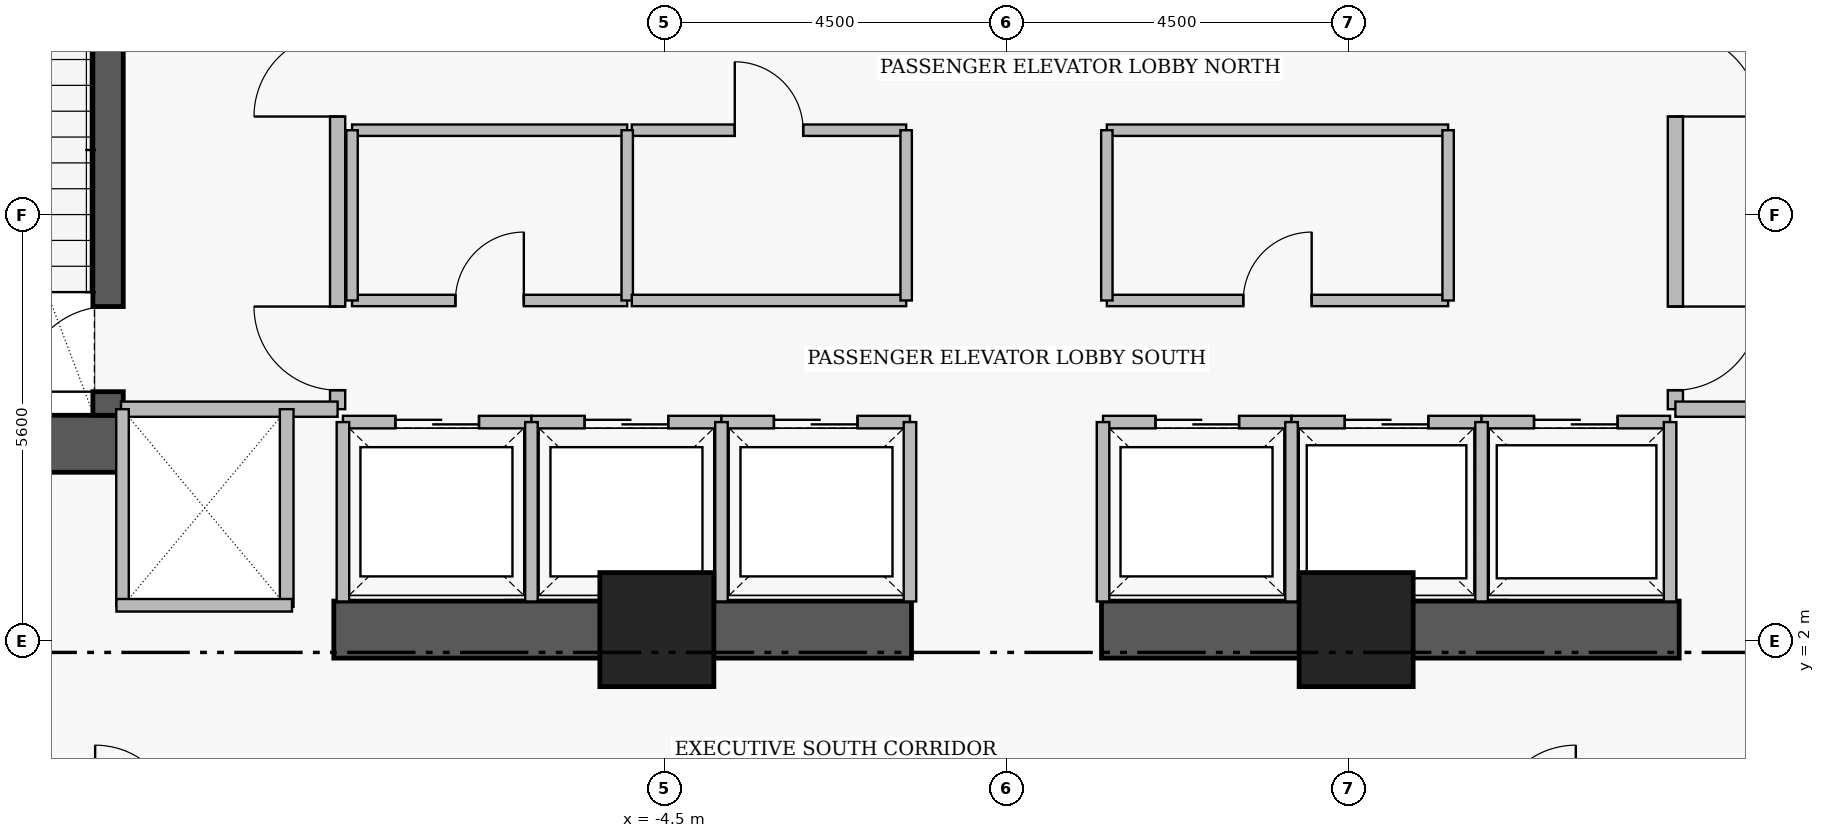
"""IFC4 building model, lengths in metres.
Left out: names, types, materials, properties, quantities, classifications, styles, units other than length and angle.
Written with IfcOpenShell. Run it as: python <this file> out.ifc"""

import sys

from ifc_helpers import new_model, si_unit, direction, frame, frame_2d, origin, origin_2d, place, context, subcontext, project, spatial, rectangle, extrude, element, fill, save


model = new_model("IFC4")
c1 = context("Model", 3, precision=1e-05, world=origin(), true_north=direction((0.0, 1.0)))
c2 = subcontext(c1, "Body", "Model", "MODEL_VIEW")
j1 = project(units=[si_unit("LENGTHUNIT", "METRE"), si_unit("PLANEANGLEUNIT", "RADIAN")], contexts=[c1])
p1 = place(None, origin())
s1 = spatial("IfcSite", under=j1, at=p1, CompositionType="ELEMENT")
p2 = place(p1, origin())
s2 = spatial("IfcBuilding", under=s1, at=p2, CompositionType="ELEMENT")
p3 = place(p2, frame((0.0, 0.0, 154.05)))
s3 = spatial("IfcBuildingStorey", under=s2, at=p3, CompositionType="ELEMENT", Elevation=154.05)
p4 = place(p3, frame((-16.16, 4.595, 0.0), z_axis=(0.0, 0.0, 1.0), x_axis=(1.0, 0.0, 0.0)))
e1 = element("IfcWall", 1, at=p4, inside=s3, PredefinedType="SHEAR", context=c2, shape_type="SweptSolid", body=[
    extrude(rectangle(XDim=4.56, YDim=0.75, at=frame_2d((2.28, 0.0))), origin(), (0.0, 0.0, 1.0), 4.31),
])
for number, where, z_axis, x_axis in (
    (2, (-8.85, 2.15, 0.0), (0.0, 0.0, 1.0), (1.0, 0.0, 0.0)),
    (3, (1.25, 2.15, 0.0), (0.0, 0.0, 1.0), (1.0, 0.0, 0.0)),
):
    element("IfcWall", number, at=place(p3, frame(where, z_axis=z_axis, x_axis=x_axis)), inside=s3, PredefinedType="SHEAR", context=c2, shape_type="SweptSolid", body=[
        extrude(rectangle(XDim=7.6, YDim=0.75, at=frame_2d((3.8, 0.0))), origin(), (0.0, 0.0, 1.0), 4.28),
    ])
p5 = place(p3, frame((-11.82, 4.97, 0.0), z_axis=(0.0, 0.0, 1.0), x_axis=(0.0, 1.0, 0.0)))
e4 = element("IfcWall", 4, at=p5, inside=s3, PredefinedType="SHEAR", context=c2, shape_type="SweptSolid", body=[
    extrude(rectangle(XDim=8.96, YDim=0.4, at=frame_2d((4.48, 0.0))), origin(), (0.0, 0.0, 1.0), 4.31),
])
p6 = place(p5, frame((0.31, 0.0, 0.0)))
e5 = element("IfcOpeningElement", 5, at=p6, cuts=e4, PredefinedType="OPENING", context=c2, shape_type="SweptSolid", body=[
    extrude(rectangle(XDim=1.12, YDim=2.22, at=frame_2d((0.56, 1.11))), frame((0.0, 0.21, 0.0), z_axis=(0.0, -1.0, 0.0), x_axis=(1.0, 0.0, 0.0)), (0.0, 0.0, 1.0), 0.42),
])
for number, where, z_axis, x_axis in (
    (6, (-4.6, 2.15, 0.0), (0.0, 0.0, 1.0), (1.0, 0.0, 0.0)),
    (7, (4.6, 2.15, 0.0), (0.0, 0.0, 1.0), (1.0, 0.0, 0.0)),
):
    element("IfcColumn", number, at=place(p3, frame(where, z_axis=z_axis, x_axis=x_axis)), inside=s3, PredefinedType="COLUMN", context=c2, shape_type="SweptSolid", body=[
        extrude(rectangle(XDim=1.5, YDim=1.5, at=origin_2d()), origin(), (0.0, 0.0, 1.0), 4.5),
    ])
p7 = place(p3, frame((-8.8, 5.05, 0.0), z_axis=(0.0, 0.0, 1.0), x_axis=(0.0, 1.0, 0.0)))
e8 = element("IfcWall", 8, at=p7, inside=s3, PredefinedType="PARTITIONING", context=c2, shape_type="SweptSolid", body=[
    extrude(rectangle(XDim=6.1, YDim=0.2, at=frame_2d((3.05, 0.0))), origin(), (0.0, 0.0, 1.0), 4.28),
])
p8 = place(p7, frame((0.25, 0.0, 0.0)))
e9 = element("IfcOpeningElement", 9, at=p8, cuts=e8, PredefinedType="OPENING", context=c2, shape_type="SweptSolid", body=[
    extrude(rectangle(XDim=1.1, YDim=2.2, at=frame_2d((0.55, 1.1))), frame((0.0, 0.11, 0.0), z_axis=(0.0, -1.0, 0.0), x_axis=(1.0, 0.0, 0.0)), (0.0, 0.0, 1.0), 0.22),
])
p9 = place(p7, frame((3.85, 0.0, 0.0)))
e10 = element("IfcOpeningElement", 10, at=p9, cuts=e8, PredefinedType="OPENING", context=c2, shape_type="SweptSolid", body=[
    extrude(rectangle(XDim=1.1, YDim=2.2, at=frame_2d((0.55, 1.1))), frame((0.0, 0.11, 0.0), z_axis=(0.0, -1.0, 0.0), x_axis=(1.0, 0.0, 0.0)), (0.0, 0.0, 1.0), 0.22),
])
p10 = place(p3, frame((8.8, 11.15, 0.0), z_axis=(0.0, 0.0, 1.0), x_axis=(0.0, -1.0, 0.0)))
e11 = element("IfcWall", 11, at=p10, inside=s3, PredefinedType="PARTITIONING", context=c2, shape_type="SweptSolid", body=[
    extrude(rectangle(XDim=6.1, YDim=0.2, at=frame_2d((3.05, 0.0))), origin(), (0.0, 0.0, 1.0), 4.28),
])
p11 = place(p10, frame((1.15, 0.0, 0.0)))
e12 = element("IfcOpeningElement", 12, at=p11, cuts=e11, PredefinedType="OPENING", context=c2, shape_type="SweptSolid", body=[
    extrude(rectangle(XDim=1.1, YDim=2.2, at=frame_2d((0.55, 1.1))), frame((0.0, 0.11, 0.0), z_axis=(0.0, -1.0, 0.0), x_axis=(1.0, 0.0, 0.0)), (0.0, 0.0, 1.0), 0.22),
])
p12 = place(p10, frame((4.75, 0.0, 0.0)))
e13 = element("IfcOpeningElement", 13, at=p12, cuts=e11, PredefinedType="OPENING", context=c2, shape_type="SweptSolid", body=[
    extrude(rectangle(XDim=1.1, YDim=2.2, at=frame_2d((0.55, 1.1))), frame((0.0, 0.11, 0.0), z_axis=(0.0, -1.0, 0.0), x_axis=(1.0, 0.0, 0.0)), (0.0, 0.0, 1.0), 0.22),
])
p13 = place(p3, frame((-8.73, 4.88, 0.0), z_axis=(0.0, 0.0, 1.0), x_axis=(1.0, 0.0, 0.0)))
e14 = element("IfcWall", 14, at=p13, inside=s3, PredefinedType="PARTITIONING", context=c2, shape_type="SweptSolid", body=[
    extrude(rectangle(XDim=2.48, YDim=0.165, at=frame_2d((1.24, 0.0))), origin(), (0.0, 0.0, 1.0), 4.28),
])
p14 = place(p13, frame((0.69, 0.0, 0.0)))
e15 = element("IfcOpeningElement", 15, at=p14, cuts=e14, PredefinedType="OPENING", context=c2, shape_type="SweptSolid", body=[
    extrude(rectangle(XDim=1.1, YDim=2.25, at=frame_2d((0.55, 1.125))), frame((0.0, 0.093, 0.0), z_axis=(0.0, -1.0, 0.0), x_axis=(1.0, 0.0, 0.0)), (0.0, 0.0, 1.0), 0.185),
])
p15 = place(p3, frame((-6.25, 4.88, 0.0), z_axis=(0.0, 0.0, 1.0), x_axis=(1.0, 0.0, 0.0)))
e16 = element("IfcWall", 16, at=p15, inside=s3, PredefinedType="PARTITIONING", context=c2, shape_type="SweptSolid", body=[
    extrude(rectangle(XDim=2.5, YDim=0.165, at=frame_2d((1.25, 0.0))), origin(), (0.0, 0.0, 1.0), 4.28),
])
p16 = place(p15, frame((0.7, 0.0, 0.0)))
e17 = element("IfcOpeningElement", 17, at=p16, cuts=e16, PredefinedType="OPENING", context=c2, shape_type="SweptSolid", body=[
    extrude(rectangle(XDim=1.1, YDim=2.25, at=frame_2d((0.55, 1.125))), frame((0.0, 0.093, 0.0), z_axis=(0.0, -1.0, 0.0), x_axis=(1.0, 0.0, 0.0)), (0.0, 0.0, 1.0), 0.185),
])
p17 = place(p3, frame((-3.75, 4.88, 0.0), z_axis=(0.0, 0.0, 1.0), x_axis=(1.0, 0.0, 0.0)))
e18 = element("IfcWall", 18, at=p17, inside=s3, PredefinedType="PARTITIONING", context=c2, shape_type="SweptSolid", body=[
    extrude(rectangle(XDim=2.48, YDim=0.165, at=frame_2d((1.24, 0.0))), origin(), (0.0, 0.0, 1.0), 4.28),
])
p18 = place(p17, frame((0.69, 0.0, 0.0)))
e19 = element("IfcOpeningElement", 19, at=p18, cuts=e18, PredefinedType="OPENING", context=c2, shape_type="SweptSolid", body=[
    extrude(rectangle(XDim=1.1, YDim=2.25, at=frame_2d((0.55, 1.125))), frame((0.0, 0.093, 0.0), z_axis=(0.0, -1.0, 0.0), x_axis=(1.0, 0.0, 0.0)), (0.0, 0.0, 1.0), 0.185),
])
p19 = place(p3, frame((1.27, 4.88, 0.0), z_axis=(0.0, 0.0, 1.0), x_axis=(1.0, 0.0, 0.0)))
e20 = element("IfcWall", 20, at=p19, inside=s3, PredefinedType="PARTITIONING", context=c2, shape_type="SweptSolid", body=[
    extrude(rectangle(XDim=2.48, YDim=0.165, at=frame_2d((1.24, 0.0))), origin(), (0.0, 0.0, 1.0), 4.28),
])
p20 = place(p19, frame((0.69, 0.0, 0.0)))
e21 = element("IfcOpeningElement", 21, at=p20, cuts=e20, PredefinedType="OPENING", context=c2, shape_type="SweptSolid", body=[
    extrude(rectangle(XDim=1.1, YDim=2.25, at=frame_2d((0.55, 1.125))), frame((0.0, 0.093, 0.0), z_axis=(0.0, -1.0, 0.0), x_axis=(1.0, 0.0, 0.0)), (0.0, 0.0, 1.0), 0.185),
])
p21 = place(p3, frame((3.75, 4.88, 0.0), z_axis=(0.0, 0.0, 1.0), x_axis=(1.0, 0.0, 0.0)))
e22 = element("IfcWall", 22, at=p21, inside=s3, PredefinedType="PARTITIONING", context=c2, shape_type="SweptSolid", body=[
    extrude(rectangle(XDim=2.5, YDim=0.165, at=frame_2d((1.25, 0.0))), origin(), (0.0, 0.0, 1.0), 4.28),
])
p22 = place(p21, frame((0.7, 0.0, 0.0)))
e23 = element("IfcOpeningElement", 23, at=p22, cuts=e22, PredefinedType="OPENING", context=c2, shape_type="SweptSolid", body=[
    extrude(rectangle(XDim=1.1, YDim=2.25, at=frame_2d((0.55, 1.125))), frame((0.0, 0.093, 0.0), z_axis=(0.0, -1.0, 0.0), x_axis=(1.0, 0.0, 0.0)), (0.0, 0.0, 1.0), 0.185),
])
p23 = place(p3, frame((6.25, 4.88, 0.0), z_axis=(0.0, 0.0, 1.0), x_axis=(1.0, 0.0, 0.0)))
e24 = element("IfcWall", 24, at=p23, inside=s3, PredefinedType="PARTITIONING", context=c2, shape_type="SweptSolid", body=[
    extrude(rectangle(XDim=2.48, YDim=0.165, at=frame_2d((1.24, 0.0))), origin(), (0.0, 0.0, 1.0), 4.28),
])
p24 = place(p23, frame((0.69, 0.0, 0.0)))
e25 = element("IfcOpeningElement", 25, at=p24, cuts=e24, PredefinedType="OPENING", context=c2, shape_type="SweptSolid", body=[
    extrude(rectangle(XDim=1.1, YDim=2.25, at=frame_2d((0.55, 1.125))), frame((0.0, 0.093, 0.0), z_axis=(0.0, -1.0, 0.0), x_axis=(1.0, 0.0, 0.0)), (0.0, 0.0, 1.0), 0.185),
])
p25 = place(p3, frame((-8.61, 6.48, 0.0), z_axis=(0.0, 0.0, 1.0), x_axis=(1.0, 0.0, 0.0)))
e26 = element("IfcWall", 26, at=p25, inside=s3, PredefinedType="PARTITIONING", context=c2, shape_type="SweptSolid", body=[
    extrude(rectangle(XDim=3.62, YDim=0.15, at=frame_2d((1.81, 0.0))), origin(), (0.0, 0.0, 1.0), 4.28),
])
p26 = place(p25, frame((1.36, 0.0, 0.0)))
e27 = element("IfcOpeningElement", 27, at=p26, cuts=e26, PredefinedType="OPENING", context=c2, shape_type="SweptSolid", body=[
    extrude(rectangle(XDim=0.9, YDim=2.15, at=frame_2d((0.45, 1.075))), frame((0.0, 0.085, 0.0), z_axis=(0.0, -1.0, 0.0), x_axis=(1.0, 0.0, 0.0)), (0.0, 0.0, 1.0), 0.17),
])
p27 = place(p3, frame((-4.93, 8.72, 0.0), z_axis=(0.0, 0.0, 1.0), x_axis=(1.0, 0.0, 0.0)))
e28 = element("IfcWall", 28, at=p27, inside=s3, PredefinedType="PARTITIONING", context=c2, shape_type="SweptSolid", body=[
    extrude(rectangle(XDim=3.61, YDim=0.15, at=frame_2d((1.805, 0.0))), origin(), (0.0, 0.0, 1.0), 4.28),
])
p28 = place(p27, frame((1.355, 0.0, 0.0)))
e29 = element("IfcOpeningElement", 29, at=p28, cuts=e28, PredefinedType="OPENING", context=c2, shape_type="SweptSolid", body=[
    extrude(rectangle(XDim=0.9, YDim=2.15, at=frame_2d((0.45, 1.075))), frame((0.0, 0.085, 0.0), z_axis=(0.0, -1.0, 0.0), x_axis=(1.0, 0.0, 0.0)), (0.0, 0.0, 1.0), 0.17),
])
p29 = place(p3, frame((1.32, 6.48, 0.0), z_axis=(0.0, 0.0, 1.0), x_axis=(1.0, 0.0, 0.0)))
e30 = element("IfcWall", 30, at=p29, inside=s3, PredefinedType="PARTITIONING", context=c2, shape_type="SweptSolid", body=[
    extrude(rectangle(XDim=4.49, YDim=0.15, at=frame_2d((2.245, 0.0))), origin(), (0.0, 0.0, 1.0), 4.28),
])
p30 = place(p29, frame((1.795, 0.0, 0.0)))
e31 = element("IfcOpeningElement", 31, at=p30, cuts=e30, PredefinedType="OPENING", context=c2, shape_type="SweptSolid", body=[
    extrude(rectangle(XDim=0.9, YDim=2.15, at=frame_2d((0.45, 1.075))), frame((0.0, 0.085, 0.0), z_axis=(0.0, -1.0, 0.0), x_axis=(1.0, 0.0, 0.0)), (0.0, 0.0, 1.0), 0.17),
])
for number, where, z_axis, x_axis in (
    (32, (-11.65, 5.05, 0.0), (0.0, 0.0, 1.0), (1.0, 0.0, 0.0)),
    (33, (8.8, 5.05, 0.0), (0.0, 0.0, 1.0), (1.0, 0.0, 0.0)),
):
    element("IfcWall", number, at=place(p3, frame(where, z_axis=z_axis, x_axis=x_axis)), inside=s3, PredefinedType="PARTITIONING", context=c2, shape_type="SweptSolid", body=[
        extrude(rectangle(XDim=2.85, YDim=0.2, at=frame_2d((1.425, 0.0))), origin(), (0.0, 0.0, 1.0), 4.28),
    ])
for number, where, z_axis, x_axis in (
    (34, (-8.73, 2.52, 0.0), (0.0, 0.0, 1.0), (0.0, 1.0, 0.0)),
    (35, (-6.25, 2.52, 0.0), (0.0, 0.0, 1.0), (0.0, 1.0, 0.0)),
    (36, (-3.75, 2.52, 0.0), (0.0, 0.0, 1.0), (0.0, 1.0, 0.0)),
    (37, (-1.27, 2.52, 0.0), (0.0, 0.0, 1.0), (0.0, 1.0, 0.0)),
    (38, (1.27, 2.52, 0.0), (0.0, 0.0, 1.0), (0.0, 1.0, 0.0)),
    (39, (3.75, 2.52, 0.0), (0.0, 0.0, 1.0), (0.0, 1.0, 0.0)),
    (40, (6.25, 2.52, 0.0), (0.0, 0.0, 1.0), (0.0, 1.0, 0.0)),
    (41, (8.73, 2.52, 0.0), (0.0, 0.0, 1.0), (0.0, 1.0, 0.0)),
):
    element("IfcWall", number, at=place(p3, frame(where, z_axis=z_axis, x_axis=x_axis)), inside=s3, PredefinedType="PARTITIONING", context=c2, shape_type="SweptSolid", body=[
        extrude(rectangle(XDim=2.36, YDim=0.165, at=frame_2d((1.18, 0.0))), origin(), (0.0, 0.0, 1.0), 4.28),
    ])
p31 = place(p3, frame((-9.47, 2.45, 0.0), z_axis=(0.0, 0.0, 1.0), x_axis=(0.0, 1.0, 0.0)))
e42 = element("IfcWall", 42, at=p31, inside=s3, PredefinedType="PARTITIONING", context=c2, shape_type="SweptSolid", body=[
    extrude(rectangle(XDim=2.6, YDim=0.18, at=frame_2d((1.3, 0.0))), origin(), (0.0, 0.0, 1.0), 4.28),
])
p32 = place(p3, frame((-11.63, 2.47, 0.0), z_axis=(0.0, 0.0, 1.0), x_axis=(0.0, 1.0, 0.0)))
e43 = element("IfcWall", 43, at=p32, inside=s3, PredefinedType="PARTITIONING", context=c2, shape_type="SweptSolid", body=[
    extrude(rectangle(XDim=2.58, YDim=0.165, at=frame_2d((1.29, 0.0))), origin(), (0.0, 0.0, 1.0), 4.28),
])
p33 = place(p3, frame((-11.71, 2.47, 0.0), z_axis=(0.0, 0.0, 1.0), x_axis=(1.0, 0.0, 0.0)))
e44 = element("IfcWall", 44, at=p33, inside=s3, PredefinedType="PARTITIONING", context=c2, shape_type="SweptSolid", body=[
    extrude(rectangle(XDim=2.31, YDim=0.165, at=frame_2d((1.155, 0.0))), origin(), (0.0, 0.0, 1.0), 2.88),
])
p34 = place(p3, frame((-8.61, 8.72, 0.0), z_axis=(0.0, 0.0, 1.0), x_axis=(1.0, 0.0, 0.0)))
e45 = element("IfcWall", 45, at=p34, inside=s3, PredefinedType="PARTITIONING", context=c2, shape_type="SweptSolid", body=[
    extrude(rectangle(XDim=3.62, YDim=0.15, at=frame_2d((1.81, 0.0))), origin(), (0.0, 0.0, 1.0), 4.28),
])
for number, where, z_axis, x_axis in (
    (46, (-8.61, 6.48, 0.0), (0.0, 0.0, 1.0), (0.0, 1.0, 0.0)),
    (47, (-4.99, 6.48, 0.0), (0.0, 0.0, 1.0), (0.0, 1.0, 0.0)),
):
    element("IfcWall", number, at=place(p3, frame(where, z_axis=z_axis, x_axis=x_axis)), inside=s3, PredefinedType="PARTITIONING", context=c2, shape_type="SweptSolid", body=[
        extrude(rectangle(XDim=2.24, YDim=0.15, at=frame_2d((1.12, 0.0))), origin(), (0.0, 0.0, 1.0), 4.28),
    ])
p35 = place(p3, frame((-4.93, 6.48, 0.0), z_axis=(0.0, 0.0, 1.0), x_axis=(1.0, 0.0, 0.0)))
e48 = element("IfcWall", 48, at=p35, inside=s3, PredefinedType="PARTITIONING", context=c2, shape_type="SweptSolid", body=[
    extrude(rectangle(XDim=3.61, YDim=0.15, at=frame_2d((1.805, 0.0))), origin(), (0.0, 0.0, 1.0), 4.28),
])
p36 = place(p3, frame((-1.32, 6.48, 0.0), z_axis=(0.0, 0.0, 1.0), x_axis=(0.0, 1.0, 0.0)))
e49 = element("IfcWall", 49, at=p36, inside=s3, PredefinedType="PARTITIONING", context=c2, shape_type="SweptSolid", body=[
    extrude(rectangle(XDim=2.24, YDim=0.15, at=frame_2d((1.12, 0.0))), origin(), (0.0, 0.0, 1.0), 4.28),
])
p37 = place(p3, frame((1.32, 8.72, 0.0), z_axis=(0.0, 0.0, 1.0), x_axis=(1.0, 0.0, 0.0)))
e50 = element("IfcWall", 50, at=p37, inside=s3, PredefinedType="PARTITIONING", context=c2, shape_type="SweptSolid", body=[
    extrude(rectangle(XDim=4.49, YDim=0.15, at=frame_2d((2.245, 0.0))), origin(), (0.0, 0.0, 1.0), 4.28),
])
for number, where, z_axis, x_axis in (
    (51, (1.32, 6.48, 0.0), (0.0, 0.0, 1.0), (0.0, 1.0, 0.0)),
    (52, (5.81, 6.48, 0.0), (0.0, 0.0, 1.0), (0.0, 1.0, 0.0)),
):
    element("IfcWall", number, at=place(p3, frame(where, z_axis=z_axis, x_axis=x_axis)), inside=s3, PredefinedType="PARTITIONING", context=c2, shape_type="SweptSolid", body=[
        extrude(rectangle(XDim=2.24, YDim=0.15, at=frame_2d((1.12, 0.0))), origin(), (0.0, 0.0, 1.0), 4.28),
    ])
p38 = place(p6, origin())
e53 = element("IfcDoor", 53, at=p38, inside=s3, OperationType="SINGLE_SWING_LEFT", PredefinedType="DOOR", context=c2, shape_type="SweptSolid", body=[
    extrude(rectangle(XDim=1.12, YDim=2.22, at=frame_2d((0.56, 1.11))), frame((0.0, 0.025, 0.0), z_axis=(0.0, -1.0, 0.0), x_axis=(1.0, 0.0, 0.0)), (0.0, 0.0, 1.0), 0.05),
])
fill(e5, e53)
p39 = place(p8, origin())
e54 = element("IfcDoor", 54, at=p39, inside=s3, OperationType="SINGLE_SWING_RIGHT", PredefinedType="DOOR", context=c2, shape_type="SweptSolid", body=[
    extrude(rectangle(XDim=1.1, YDim=2.2, at=frame_2d((0.55, 1.1))), frame((0.0, 0.025, 0.0), z_axis=(0.0, -1.0, 0.0), x_axis=(1.0, 0.0, 0.0)), (0.0, 0.0, 1.0), 0.05),
])
fill(e9, e54)
p40 = place(p9, origin())
e55 = element("IfcDoor", 55, at=p40, inside=s3, OperationType="SINGLE_SWING_LEFT", PredefinedType="DOOR", context=c2, shape_type="SweptSolid", body=[
    extrude(rectangle(XDim=1.1, YDim=2.2, at=frame_2d((0.55, 1.1))), frame((0.0, 0.025, 0.0), z_axis=(0.0, -1.0, 0.0), x_axis=(1.0, 0.0, 0.0)), (0.0, 0.0, 1.0), 0.05),
])
fill(e10, e55)
p41 = place(p11, origin())
e56 = element("IfcDoor", 56, at=p41, inside=s3, OperationType="SINGLE_SWING_RIGHT", PredefinedType="DOOR", context=c2, shape_type="SweptSolid", body=[
    extrude(rectangle(XDim=1.1, YDim=2.2, at=frame_2d((0.55, 1.1))), frame((0.0, 0.025, 0.0), z_axis=(0.0, -1.0, 0.0), x_axis=(1.0, 0.0, 0.0)), (0.0, 0.0, 1.0), 0.05),
])
fill(e12, e56)
p42 = place(p12, origin())
e57 = element("IfcDoor", 57, at=p42, inside=s3, OperationType="SINGLE_SWING_LEFT", PredefinedType="DOOR", context=c2, shape_type="SweptSolid", body=[
    extrude(rectangle(XDim=1.1, YDim=2.2, at=frame_2d((0.55, 1.1))), frame((0.0, 0.025, 0.0), z_axis=(0.0, -1.0, 0.0), x_axis=(1.0, 0.0, 0.0)), (0.0, 0.0, 1.0), 0.05),
])
fill(e13, e57)
p43 = place(p14, origin())
e58 = element("IfcDoor", 58, at=p43, inside=s3, OperationType="SLIDING_TO_LEFT", PredefinedType="DOOR", context=c2, shape_type="SweptSolid", body=[
    extrude(rectangle(XDim=1.1, YDim=2.25, at=frame_2d((0.55, 1.125))), frame((0.0, 0.025, 0.0), z_axis=(0.0, -1.0, 0.0), x_axis=(1.0, 0.0, 0.0)), (0.0, 0.0, 1.0), 0.05),
])
fill(e15, e58)
p44 = place(p16, origin())
e59 = element("IfcDoor", 59, at=p44, inside=s3, OperationType="SLIDING_TO_LEFT", PredefinedType="DOOR", context=c2, shape_type="SweptSolid", body=[
    extrude(rectangle(XDim=1.1, YDim=2.25, at=frame_2d((0.55, 1.125))), frame((0.0, 0.025, 0.0), z_axis=(0.0, -1.0, 0.0), x_axis=(1.0, 0.0, 0.0)), (0.0, 0.0, 1.0), 0.05),
])
fill(e17, e59)
p45 = place(p18, origin())
e60 = element("IfcDoor", 60, at=p45, inside=s3, OperationType="SLIDING_TO_LEFT", PredefinedType="DOOR", context=c2, shape_type="SweptSolid", body=[
    extrude(rectangle(XDim=1.1, YDim=2.25, at=frame_2d((0.55, 1.125))), frame((0.0, 0.025, 0.0), z_axis=(0.0, -1.0, 0.0), x_axis=(1.0, 0.0, 0.0)), (0.0, 0.0, 1.0), 0.05),
])
fill(e19, e60)
p46 = place(p20, origin())
e61 = element("IfcDoor", 61, at=p46, inside=s3, OperationType="SLIDING_TO_LEFT", PredefinedType="DOOR", context=c2, shape_type="SweptSolid", body=[
    extrude(rectangle(XDim=1.1, YDim=2.25, at=frame_2d((0.55, 1.125))), frame((0.0, 0.025, 0.0), z_axis=(0.0, -1.0, 0.0), x_axis=(1.0, 0.0, 0.0)), (0.0, 0.0, 1.0), 0.05),
])
fill(e21, e61)
p47 = place(p22, origin())
e62 = element("IfcDoor", 62, at=p47, inside=s3, OperationType="SLIDING_TO_LEFT", PredefinedType="DOOR", context=c2, shape_type="SweptSolid", body=[
    extrude(rectangle(XDim=1.1, YDim=2.25, at=frame_2d((0.55, 1.125))), frame((0.0, 0.025, 0.0), z_axis=(0.0, -1.0, 0.0), x_axis=(1.0, 0.0, 0.0)), (0.0, 0.0, 1.0), 0.05),
])
fill(e23, e62)
p48 = place(p24, origin())
e63 = element("IfcDoor", 63, at=p48, inside=s3, OperationType="SLIDING_TO_LEFT", PredefinedType="DOOR", context=c2, shape_type="SweptSolid", body=[
    extrude(rectangle(XDim=1.1, YDim=2.25, at=frame_2d((0.55, 1.125))), frame((0.0, 0.025, 0.0), z_axis=(0.0, -1.0, 0.0), x_axis=(1.0, 0.0, 0.0)), (0.0, 0.0, 1.0), 0.05),
])
fill(e25, e63)
p49 = place(p26, origin())
e64 = element("IfcDoor", 64, at=p49, inside=s3, OperationType="SINGLE_SWING_RIGHT", PredefinedType="DOOR", context=c2, shape_type="SweptSolid", body=[
    extrude(rectangle(XDim=0.9, YDim=2.15, at=frame_2d((0.45, 1.075))), frame((0.0, 0.025, 0.0), z_axis=(0.0, -1.0, 0.0), x_axis=(1.0, 0.0, 0.0)), (0.0, 0.0, 1.0), 0.05),
])
fill(e27, e64)
p50 = place(p28, origin())
e65 = element("IfcDoor", 65, at=p50, inside=s3, OperationType="SINGLE_SWING_LEFT", PredefinedType="DOOR", context=c2, shape_type="SweptSolid", body=[
    extrude(rectangle(XDim=0.9, YDim=2.15, at=frame_2d((0.45, 1.075))), frame((0.0, 0.025, 0.0), z_axis=(0.0, -1.0, 0.0), x_axis=(1.0, 0.0, 0.0)), (0.0, 0.0, 1.0), 0.05),
])
fill(e29, e65)
p51 = place(p30, origin())
e66 = element("IfcDoor", 66, at=p51, inside=s3, OperationType="SINGLE_SWING_RIGHT", PredefinedType="DOOR", context=c2, shape_type="SweptSolid", body=[
    extrude(rectangle(XDim=0.9, YDim=2.15, at=frame_2d((0.45, 1.075))), frame((0.0, 0.025, 0.0), z_axis=(0.0, -1.0, 0.0), x_axis=(1.0, 0.0, 0.0)), (0.0, 0.0, 1.0), 0.05),
])
fill(e31, e66)
save(model, sys.argv[1])
